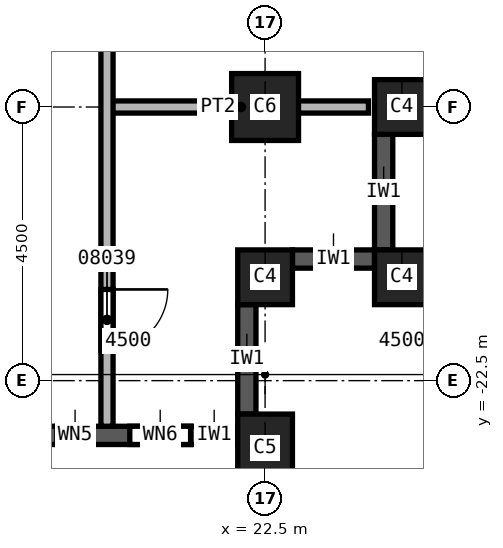
"""IFC4 building model, lengths in metres.
Left out: names, types, materials, properties, quantities, classifications, styles, units other than length and angle.
Written with IfcOpenShell. Run it as: python <this file> out.ifc"""

import sys

from ifc_helpers import new_model, si_unit, direction, frame, frame_2d, origin, origin_2d, place, context, subcontext, project, spatial, rectangle, extrude, element, fill, save


model = new_model("IFC4")
c1 = context("Model", 3, precision=1e-05, world=origin(), true_north=direction((0.0, 1.0)))
c2 = subcontext(c1, "Body", "Model", "MODEL_VIEW")
j1 = project(units=[si_unit("LENGTHUNIT", "METRE"), si_unit("PLANEANGLEUNIT", "RADIAN")], contexts=[c1])
p1 = place(None, origin())
s1 = spatial("IfcSite", under=j1, at=p1, CompositionType="ELEMENT")
p2 = place(p1, origin())
s2 = spatial("IfcBuilding", under=s1, at=p2, CompositionType="ELEMENT")
p3 = place(p2, frame((0.0, 0.0, 150.0)))
s3 = spatial("IfcBuildingStorey", under=s2, at=p3, CompositionType="ELEMENT", Elevation=150.0)
p4 = place(p3, frame((22.5, -18.0, 0.0), z_axis=(0.0, 0.0, 1.0), x_axis=(1.0, 0.0, 0.0)))
e1 = element("IfcColumn", 1, at=p4, inside=s3, PredefinedType="COLUMN", context=c2, shape_type="SweptSolid", body=[
    extrude(rectangle(XDim=1.1, YDim=1.1, at=origin_2d()), origin(), (0.0, 0.0, 1.0), 3.7),
])
p5 = place(p3, frame((22.5, -23.6, 0.0), z_axis=(0.0, 0.0, 1.0), x_axis=(1.0, 0.0, 0.0)))
e2 = element("IfcColumn", 2, at=p5, inside=s3, PredefinedType="COLUMN", context=c2, shape_type="SweptSolid", body=[
    extrude(rectangle(XDim=0.9, YDim=1.1, at=origin_2d()), origin(), (0.0, 0.0, 1.0), 3.7),
])
for number, where, z_axis, x_axis in (
    (3, (22.5, -20.8, 0.0), (0.0, 0.0, 1.0), (1.0, 0.0, 0.0)),
    (4, (24.75, -20.8, 0.0), (0.0, 0.0, 1.0), (1.0, 0.0, 0.0)),
    (5, (24.75, -18.0, 0.0), (0.0, 0.0, 1.0), (1.0, 0.0, 0.0)),
):
    element("IfcColumn", number, at=place(p3, frame(where, z_axis=z_axis, x_axis=x_axis)), inside=s3, PredefinedType="COLUMN", context=c2, shape_type="SweptSolid", body=[
        extrude(rectangle(XDim=0.9, YDim=0.9, at=origin_2d()), origin(), (0.0, 0.0, 1.0), 3.7),
    ])
p6 = place(p3, frame((18.45, -23.4, 0.0), z_axis=(0.0, 0.0, 1.0), x_axis=(1.0, 0.0, 0.0)))
e6 = element("IfcWall", 6, at=p6, inside=s3, PredefinedType="SOLIDWALL", context=c2, shape_type="SweptSolid", body=[
    extrude(rectangle(XDim=3.6, YDim=0.3, at=frame_2d((1.8, 0.0))), origin(), (0.0, 0.0, 1.0), 3.1),
])
p7 = place(p6, frame((0.625, 0.0, 0.8)))
e7 = element("IfcOpeningElement", 7, at=p7, cuts=e6, PredefinedType="OPENING", context=c2, shape_type="SweptSolid", body=[
    extrude(rectangle(XDim=0.6, YDim=1.95, at=frame_2d((0.3, 0.975))), frame((0.0, 0.15, 0.0), z_axis=(0.0, -1.0, 0.0), x_axis=(1.0, 0.0, 0.0)), (0.0, 0.0, 1.0), 0.3),
])
p8 = place(p6, frame((1.825, 0.0, 0.8)))
e8 = element("IfcOpeningElement", 8, at=p8, cuts=e6, PredefinedType="OPENING", context=c2, shape_type="SweptSolid", body=[
    extrude(rectangle(XDim=1.0, YDim=1.95, at=frame_2d((0.5, 0.975))), frame((0.0, 0.15, 0.0), z_axis=(0.0, -1.0, 0.0), x_axis=(1.0, 0.0, 0.0)), (0.0, 0.0, 1.0), 0.3),
])
p9 = place(p3, frame((22.2, -23.05, 0.0), z_axis=(0.0, 0.0, 1.0), x_axis=(0.0, 1.0, 0.0)))
e9 = element("IfcWall", 9, at=p9, inside=s3, PredefinedType="SOLIDWALL", context=c2, shape_type="SweptSolid", body=[
    extrude(rectangle(XDim=1.8, YDim=0.3, at=frame_2d((0.9, 0.0))), origin(), (0.0, 0.0, 1.0), 3.1),
])
p10 = place(p3, frame((22.95, -20.5, 0.0), z_axis=(0.0, 0.0, 1.0), x_axis=(1.0, 0.0, 0.0)))
e10 = element("IfcWall", 10, at=p10, inside=s3, PredefinedType="SOLIDWALL", context=c2, shape_type="SweptSolid", body=[
    extrude(rectangle(XDim=1.35, YDim=0.3, at=frame_2d((0.675, 0.0))), origin(), (0.0, 0.0, 1.0), 3.1),
])
p11 = place(p3, frame((24.45, -20.35, 0.0), z_axis=(0.0, 0.0, 1.0), x_axis=(0.0, 1.0, 0.0)))
e11 = element("IfcWall", 11, at=p11, inside=s3, PredefinedType="SOLIDWALL", context=c2, shape_type="SweptSolid", body=[
    extrude(rectangle(XDim=1.9, YDim=0.3, at=frame_2d((0.95, 0.0))), origin(), (0.0, 0.0, 1.0), 3.1),
])
p12 = place(p3, frame((19.9, -18.0, 0.0), z_axis=(0.0, 0.0, 1.0), x_axis=(1.0, 0.0, 0.0)))
e12 = element("IfcWall", 12, at=p12, inside=s3, PredefinedType="PARTITIONING", context=c2, shape_type="SweptSolid", body=[
    extrude(rectangle(XDim=4.3, YDim=0.2, at=frame_2d((2.15, 0.0))), origin(), (0.0, 0.0, 1.0), 3.7),
])
p13 = place(p3, frame((19.9, -3.65, 0.0), z_axis=(0.0, 0.0, 1.0), x_axis=(0.0, -1.0, 0.0)))
e13 = element("IfcWall", 13, at=p13, inside=s3, PredefinedType="PARTITIONING", context=c2, shape_type="SweptSolid", body=[
    extrude(rectangle(XDim=19.6, YDim=0.2, at=frame_2d((9.8, 0.0))), origin(), (0.0, 0.0, 1.0), 3.7),
])
p14 = place(p13, frame((17.35, 0.0, 0.0)))
e14 = element("IfcOpeningElement", 14, at=p14, cuts=e13, PredefinedType="OPENING", context=c2, shape_type="SweptSolid", body=[
    extrude(rectangle(XDim=1.0, YDim=2.1, at=frame_2d((0.5, 1.05))), frame((0.0, 0.1, 0.0), z_axis=(0.0, -1.0, 0.0), x_axis=(1.0, 0.0, 0.0)), (0.0, 0.0, 1.0), 0.2),
])
p15 = place(p13, frame((9.4, 0.0, 0.0)))
e15 = element("IfcOpeningElement", 15, at=p15, cuts=e13, PredefinedType="OPENING", context=c2, shape_type="SweptSolid", body=[
    extrude(rectangle(XDim=1.0, YDim=2.1, at=frame_2d((0.5, 1.05))), frame((0.0, 0.1, 0.0), z_axis=(0.0, -1.0, 0.0), x_axis=(1.0, 0.0, 0.0)), (0.0, 0.0, 1.0), 0.2),
])
p16 = place(p14, origin())
e16 = element("IfcDoor", 16, at=p16, inside=s3, OperationType="SINGLE_SWING_RIGHT", PredefinedType="DOOR", context=c2, shape_type="SweptSolid", body=[
    extrude(rectangle(XDim=1.0, YDim=2.1, at=frame_2d((0.5, 1.05))), frame((0.0, 0.025, 0.0), z_axis=(0.0, -1.0, 0.0), x_axis=(1.0, 0.0, 0.0)), (0.0, 0.0, 1.0), 0.05),
])
fill(e14, e16)
p17 = place(p7, origin())
e17 = element("IfcWindow", 17, at=p17, inside=s3, PartitioningType="SINGLE_PANEL", PredefinedType="WINDOW", context=c2, shape_type="SweptSolid", body=[
    extrude(rectangle(XDim=0.6, YDim=1.95, at=frame_2d((0.3, 0.975))), frame((0.0, 0.03, 0.0), z_axis=(0.0, -1.0, 0.0), x_axis=(1.0, 0.0, 0.0)), (0.0, 0.0, 1.0), 0.06),
])
fill(e7, e17)
p18 = place(p8, origin())
e18 = element("IfcWindow", 18, at=p18, inside=s3, PartitioningType="SINGLE_PANEL", PredefinedType="WINDOW", context=c2, shape_type="SweptSolid", body=[
    extrude(rectangle(XDim=1.0, YDim=1.95, at=frame_2d((0.5, 0.975))), frame((0.0, 0.03, 0.0), z_axis=(0.0, -1.0, 0.0), x_axis=(1.0, 0.0, 0.0)), (0.0, 0.0, 1.0), 0.06),
])
fill(e8, e18)
save(model, sys.argv[1])
